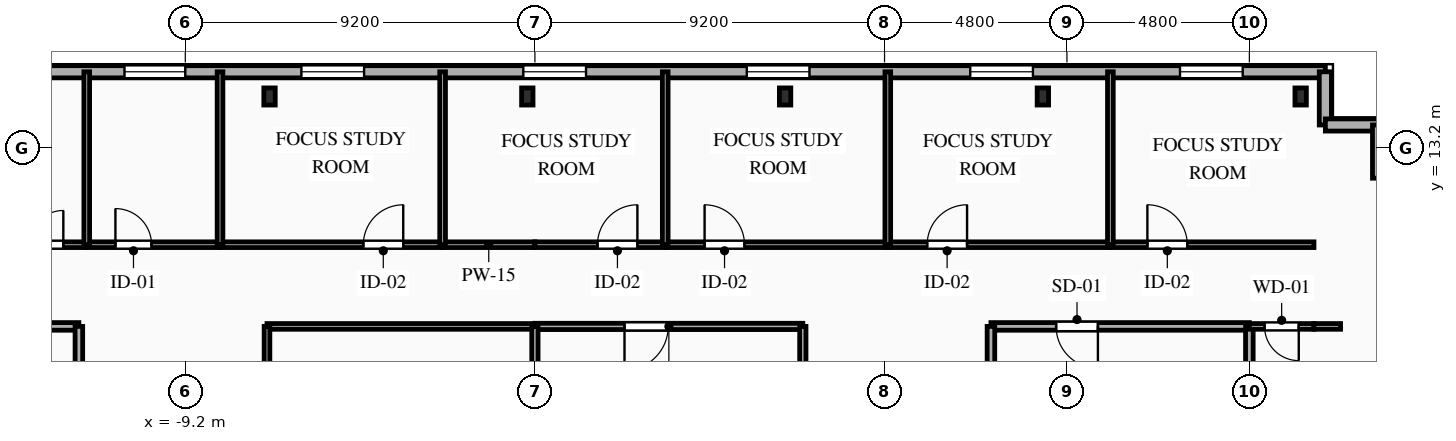
"""IFC4 building model, lengths in metres.
Left out: names, types, materials, properties, quantities, classifications, styles, units other than length and angle.
Written with IfcOpenShell. Run it as: python <this file> out.ifc"""

import sys

from ifc_helpers import new_model, si_unit, direction, frame, frame_2d, origin, origin_2d, place, context, subcontext, project, spatial, rectangle, i_section, extrude, element, fill, save


model = new_model("IFC4")
c1 = context("Model", 3, precision=1e-05, world=origin(), true_north=direction((0.0, 1.0)))
c2 = subcontext(c1, "Body", "Model", "MODEL_VIEW")
j1 = project(units=[si_unit("LENGTHUNIT", "METRE"), si_unit("PLANEANGLEUNIT", "RADIAN")], contexts=[c1])
p1 = place(None, origin())
s1 = spatial("IfcSite", under=j1, at=p1, CompositionType="ELEMENT")
p2 = place(p1, origin())
s2 = spatial("IfcBuilding", under=s1, at=p2, CompositionType="ELEMENT")
p3 = place(p2, frame((0.0, 0.0, 245.05)))
s3 = spatial("IfcBuildingStorey", under=s2, at=p3, CompositionType="ELEMENT", Elevation=245.05)
for number, where, z_axis, x_axis in (
    (1, (20.15, 14.55, 0.0), (0.0, 0.0, 1.0), (1.0, 0.0, 0.0)),
    (2, (13.367, 14.55, 0.0), (0.0, 0.0, 1.0), (1.0, 0.0, 0.0)),
    (3, (6.583, 14.55, 0.0), (0.0, 0.0, 1.0), (1.0, 0.0, 0.0)),
    (4, (-0.2, 14.55, 0.0), (0.0, 0.0, 1.0), (1.0, 0.0, 0.0)),
    (5, (-6.983, 14.55, 0.0), (0.0, 0.0, 1.0), (1.0, 0.0, 0.0)),
):
    element("IfcColumn", number, at=place(p3, frame(where, z_axis=z_axis, x_axis=x_axis)), inside=s3, PredefinedType="COLUMN", context=c2, shape_type="SweptSolid", body=[
        extrude(i_section(OverallWidth=0.3, OverallDepth=0.45, WebThickness=0.014, FlangeThickness=0.026, FilletRadius=0.027, at=origin_2d()), origin(), (0.0, 0.0, 1.0), 3.35),
    ])
p4 = place(p3, frame((-21.2, 15.2, 0.0), z_axis=(0.0, 0.0, 1.0), x_axis=(1.0, 0.0, 0.0)))
e6 = element("IfcWall", 6, at=p4, inside=s3, PredefinedType="SOLIDWALL", context=c2, shape_type="SweptSolid", body=[
    extrude(rectangle(XDim=42.0, YDim=0.32, at=frame_2d((21.0, 0.0))), origin(), (0.0, 0.0, 1.0), 3.04),
])
p5 = place(p4, frame((3.095, 0.0, 0.85)))
e7 = element("IfcOpeningElement", 7, at=p5, cuts=e6, PredefinedType="OPENING", context=c2, shape_type="SweptSolid", body=[
    extrude(rectangle(XDim=1.65, YDim=1.85, at=frame_2d((0.825, 0.925))), frame((0.0, 0.17, 0.0), z_axis=(0.0, -1.0, 0.0), x_axis=(1.0, 0.0, 0.0)), (0.0, 0.0, 1.0), 0.34),
])
p6 = place(p4, frame((10.4, 0.0, 0.85)))
e8 = element("IfcOpeningElement", 8, at=p6, cuts=e6, PredefinedType="OPENING", context=c2, shape_type="SweptSolid", body=[
    extrude(rectangle(XDim=1.6, YDim=1.85, at=frame_2d((0.8, 0.925))), frame((0.0, 0.17, 0.0), z_axis=(0.0, -1.0, 0.0), x_axis=(1.0, 0.0, 0.0)), (0.0, 0.0, 1.0), 0.34),
])
p7 = place(p4, frame((15.055, 0.0, 0.85)))
e9 = element("IfcOpeningElement", 9, at=p7, cuts=e6, PredefinedType="OPENING", context=c2, shape_type="SweptSolid", body=[
    extrude(rectangle(XDim=1.65, YDim=1.85, at=frame_2d((0.825, 0.925))), frame((0.0, 0.17, 0.0), z_axis=(0.0, -1.0, 0.0), x_axis=(1.0, 0.0, 0.0)), (0.0, 0.0, 1.0), 0.34),
])
p8 = place(p4, frame((20.895, 0.0, 0.85)))
e10 = element("IfcOpeningElement", 10, at=p8, cuts=e6, PredefinedType="OPENING", context=c2, shape_type="SweptSolid", body=[
    extrude(rectangle(XDim=1.65, YDim=1.85, at=frame_2d((0.825, 0.925))), frame((0.0, 0.17, 0.0), z_axis=(0.0, -1.0, 0.0), x_axis=(1.0, 0.0, 0.0)), (0.0, 0.0, 1.0), 0.34),
])
p9 = place(p4, frame((26.775, 0.0, 0.85)))
e11 = element("IfcOpeningElement", 11, at=p9, cuts=e6, PredefinedType="OPENING", context=c2, shape_type="SweptSolid", body=[
    extrude(rectangle(XDim=1.65, YDim=1.85, at=frame_2d((0.825, 0.925))), frame((0.0, 0.17, 0.0), z_axis=(0.0, -1.0, 0.0), x_axis=(1.0, 0.0, 0.0)), (0.0, 0.0, 1.0), 0.34),
])
p10 = place(p4, frame((32.655, 0.0, 0.85)))
e12 = element("IfcOpeningElement", 12, at=p10, cuts=e6, PredefinedType="OPENING", context=c2, shape_type="SweptSolid", body=[
    extrude(rectangle(XDim=1.65, YDim=1.85, at=frame_2d((0.825, 0.925))), frame((0.0, 0.17, 0.0), z_axis=(0.0, -1.0, 0.0), x_axis=(1.0, 0.0, 0.0)), (0.0, 0.0, 1.0), 0.34),
])
p11 = place(p4, frame((38.175, 0.0, 0.85)))
e13 = element("IfcOpeningElement", 13, at=p11, cuts=e6, PredefinedType="OPENING", context=c2, shape_type="SweptSolid", body=[
    extrude(rectangle(XDim=1.65, YDim=1.85, at=frame_2d((0.825, 0.925))), frame((0.0, 0.17, 0.0), z_axis=(0.0, -1.0, 0.0), x_axis=(1.0, 0.0, 0.0)), (0.0, 0.0, 1.0), 0.34),
])
for number, where, z_axis, x_axis in (
    (14, (20.8, 15.2, 0.0), (0.0, 0.0, 1.0), (0.0, -1.0, 0.0)),
    (15, (20.8, 13.8, 0.0), (0.0, 0.0, 1.0), (1.0, 0.0, 0.0)),
):
    element("IfcWall", number, at=place(p3, frame(where, z_axis=z_axis, x_axis=x_axis)), inside=s3, PredefinedType="SOLIDWALL", context=c2, shape_type="SweptSolid", body=[
        extrude(rectangle(XDim=1.4, YDim=0.32, at=frame_2d((0.7, 0.0))), origin(), (0.0, 0.0, 1.0), 3.04),
    ])
p12 = place(p3, frame((22.2, 13.8, 0.0), z_axis=(0.0, 0.0, 1.0), x_axis=(0.0, -1.0, 0.0)))
e16 = element("IfcWall", 16, at=p12, inside=s3, PredefinedType="SOLIDWALL", context=c2, shape_type="SweptSolid", body=[
    extrude(rectangle(XDim=1.4, YDim=0.32, at=frame_2d((0.7, 0.0))), origin(), (0.0, 0.0, 1.0), 3.04),
])
p13 = place(p3, frame((-12.0, 8.5, 0.0), z_axis=(0.0, 0.0, 1.0), x_axis=(-1.0, 0.0, 0.0)))
e17 = element("IfcWall", 17, at=p13, inside=s3, PredefinedType="PARTITIONING", context=c2, shape_type="SweptSolid", body=[
    extrude(rectangle(XDim=6.8, YDim=0.2, at=frame_2d((3.4, 0.0))), origin(), (0.0, 0.0, 1.0), 3.04),
])
p14 = place(p13, frame((1.715, 0.0, 0.0)))
e18 = element("IfcOpeningElement", 18, at=p14, cuts=e17, PredefinedType="OPENING", context=c2, shape_type="SweptSolid", body=[
    extrude(rectangle(XDim=1.1, YDim=2.15, at=frame_2d((0.55, 1.075))), frame((0.0, 0.11, 0.0), z_axis=(0.0, -1.0, 0.0), x_axis=(1.0, 0.0, 0.0)), (0.0, 0.0, 1.0), 0.22),
])
p15 = place(p3, frame((-12.0, 5.6, 0.0), z_axis=(0.0, 0.0, 1.0), x_axis=(0.0, 1.0, 0.0)))
e19 = element("IfcWall", 19, at=p15, inside=s3, PredefinedType="PARTITIONING", context=c2, shape_type="SweptSolid", body=[
    extrude(rectangle(XDim=2.9, YDim=0.2, at=frame_2d((1.45, 0.0))), origin(), (0.0, 0.0, 1.0), 3.04),
])
p16 = place(p3, frame((18.8, 8.5, 0.0), z_axis=(0.0, 0.0, 1.0), x_axis=(-1.0, 0.0, 0.0)))
e20 = element("IfcWall", 20, at=p16, inside=s3, PredefinedType="PARTITIONING", context=c2, shape_type="SweptSolid", body=[
    extrude(rectangle(XDim=6.8, YDim=0.2, at=frame_2d((3.4, 0.0))), origin(), (0.0, 0.0, 1.0), 3.04),
])
p17 = place(p16, frame((3.985, 0.0, 0.0)))
e21 = element("IfcOpeningElement", 21, at=p17, cuts=e20, PredefinedType="OPENING", context=c2, shape_type="SweptSolid", body=[
    extrude(rectangle(XDim=1.1, YDim=2.15, at=frame_2d((0.55, 1.075))), frame((0.0, 0.11, 0.0), z_axis=(0.0, -1.0, 0.0), x_axis=(1.0, 0.0, 0.0)), (0.0, 0.0, 1.0), 0.22),
])
p18 = place(p3, frame((12.0, 8.5, 0.0), z_axis=(0.0, 0.0, 1.0), x_axis=(0.0, -1.0, 0.0)))
e22 = element("IfcWall", 22, at=p18, inside=s3, PredefinedType="PARTITIONING", context=c2, shape_type="SweptSolid", body=[
    extrude(rectangle(XDim=2.9, YDim=0.2, at=frame_2d((1.45, 0.0))), origin(), (0.0, 0.0, 1.0), 3.04),
])
p19 = place(p3, frame((18.8, 5.6, 0.0), z_axis=(0.0, 0.0, 1.0), x_axis=(0.0, 1.0, 0.0)))
e23 = element("IfcWall", 23, at=p19, inside=s3, PredefinedType="PARTITIONING", context=c2, shape_type="SweptSolid", body=[
    extrude(rectangle(XDim=2.9, YDim=0.2, at=frame_2d((1.45, 0.0))), origin(), (0.0, 0.0, 1.0), 2.665),
])
p20 = place(p3, frame((-14.143, 10.65, 0.0), z_axis=(0.0, 0.0, 1.0), x_axis=(1.0, 0.0, 0.0)))
e24 = element("IfcWall", 24, at=p20, inside=s3, PredefinedType="PLUMBINGWALL", context=c2, shape_type="SweptSolid", body=[
    extrude(rectangle(XDim=2.35, YDim=0.15, at=frame_2d((1.175, 0.0))), origin(), (0.0, 0.0, 1.0), 3.04),
])
p21 = place(p20, frame((0.834, 0.0, 0.0)))
e25 = element("IfcOpeningElement", 25, at=p21, cuts=e24, PredefinedType="OPENING", context=c2, shape_type="SweptSolid", body=[
    extrude(rectangle(XDim=0.9, YDim=2.1, at=frame_2d((0.45, 1.05))), frame((0.0, 0.085, 0.0), z_axis=(0.0, -1.0, 0.0), x_axis=(1.0, 0.0, 0.0)), (0.0, 0.0, 1.0), 0.17),
])
p22 = place(p3, frame((-11.793, 10.65, 0.0), z_axis=(0.0, 0.0, 1.0), x_axis=(1.0, 0.0, 0.0)))
e26 = element("IfcWall", 26, at=p22, inside=s3, PredefinedType="PARTITIONING", context=c2, shape_type="SweptSolid", body=[
    extrude(rectangle(XDim=3.507, YDim=0.15, at=frame_2d((1.753, 0.0))), origin(), (0.0, 0.0, 1.0), 3.04),
])
p23 = place(p22, frame((0.755, 0.0, 0.0)))
e27 = element("IfcOpeningElement", 27, at=p23, cuts=e26, PredefinedType="OPENING", context=c2, shape_type="SweptSolid", body=[
    extrude(rectangle(XDim=0.95, YDim=2.1, at=frame_2d((0.475, 1.05))), frame((0.0, 0.085, 0.0), z_axis=(0.0, -1.0, 0.0), x_axis=(1.0, 0.0, 0.0)), (0.0, 0.0, 1.0), 0.17),
])
p24 = place(p3, frame((-8.286, 10.65, 0.0), z_axis=(0.0, 0.0, 1.0), x_axis=(1.0, 0.0, 0.0)))
e28 = element("IfcWall", 28, at=p24, inside=s3, PredefinedType="PARTITIONING", context=c2, shape_type="SweptSolid", body=[
    extrude(rectangle(XDim=5.857, YDim=0.15, at=frame_2d((2.928, 0.0))), origin(), (0.0, 0.0, 1.0), 3.04),
])
p25 = place(p24, frame((3.771, 0.0, 0.0)))
e29 = element("IfcOpeningElement", 29, at=p25, cuts=e28, PredefinedType="OPENING", context=c2, shape_type="SweptSolid", body=[
    extrude(rectangle(XDim=1.05, YDim=2.15, at=frame_2d((0.525, 1.075))), frame((0.0, 0.085, 0.0), z_axis=(0.0, -1.0, 0.0), x_axis=(1.0, 0.0, 0.0)), (0.0, 0.0, 1.0), 0.17),
])
p26 = place(p3, frame((-2.429, 10.65, 0.0), z_axis=(0.0, 0.0, 1.0), x_axis=(1.0, 0.0, 0.0)))
e30 = element("IfcWall", 30, at=p26, inside=s3, PredefinedType="PARTITIONING", context=c2, shape_type="SweptSolid", body=[
    extrude(rectangle(XDim=2.429, YDim=0.15, at=frame_2d((1.214, 0.0))), origin(), (0.0, 0.0, 1.0), 3.04),
])
p27 = place(p3, frame((0.0, 8.5, 0.0), z_axis=(0.0, 0.0, 1.0), x_axis=(-1.0, 0.0, 0.0)))
e31 = element("IfcWall", 31, at=p27, inside=s3, PredefinedType="PARTITIONING", context=c2, shape_type="SweptSolid", body=[
    extrude(rectangle(XDim=7.05, YDim=0.15, at=frame_2d((3.525, 0.0))), origin(), (0.0, 0.0, 1.0), 3.04),
])
p28 = place(p3, frame((20.5, 8.5, 0.0), z_axis=(0.0, 0.0, 1.0), x_axis=(-1.0, 0.0, 0.0)))
e32 = element("IfcWall", 32, at=p28, inside=s3, PredefinedType="PARTITIONING", context=c2, shape_type="SweptSolid", body=[
    extrude(rectangle(XDim=1.7, YDim=0.15, at=frame_2d((0.85, 0.0))), origin(), (0.0, 0.0, 1.0), 3.04),
])
p29 = place(p28, frame((0.4, 0.0, 0.0)))
e33 = element("IfcOpeningElement", 33, at=p29, cuts=e32, PredefinedType="OPENING", context=c2, shape_type="SweptSolid", body=[
    extrude(rectangle(XDim=0.9, YDim=2.1, at=frame_2d((0.45, 1.05))), frame((0.0, 0.085, 0.0), z_axis=(0.0, -1.0, 0.0), x_axis=(1.0, 0.0, 0.0)), (0.0, 0.0, 1.0), 0.17),
])
p30 = place(p3, frame((21.2, 8.5, 0.0), z_axis=(0.0, 0.0, 1.0), x_axis=(-1.0, 0.0, 0.0)))
e34 = element("IfcWall", 34, at=p30, inside=s3, PredefinedType="PARTITIONING", context=c2, shape_type="SweptSolid", body=[
    extrude(rectangle(XDim=0.7, YDim=0.15, at=frame_2d((0.35, 0.0))), origin(), (0.0, 0.0, 1.0), 3.04),
])
p31 = place(p3, frame((0.0, 10.65, 0.0), z_axis=(0.0, 0.0, 1.0), x_axis=(1.0, 0.0, 0.0)))
e35 = element("IfcWall", 35, at=p31, inside=s3, PredefinedType="PARTITIONING", context=c2, shape_type="SweptSolid", body=[
    extrude(rectangle(XDim=3.429, YDim=0.15, at=frame_2d((1.714, 0.0))), origin(), (0.0, 0.0, 1.0), 3.04),
])
p32 = place(p31, frame((1.646, 0.0, 0.0)))
e36 = element("IfcOpeningElement", 36, at=p32, cuts=e35, PredefinedType="OPENING", context=c2, shape_type="SweptSolid", body=[
    extrude(rectangle(XDim=1.05, YDim=2.15, at=frame_2d((0.525, 1.075))), frame((0.0, 0.085, 0.0), z_axis=(0.0, -1.0, 0.0), x_axis=(1.0, 0.0, 0.0)), (0.0, 0.0, 1.0), 0.17),
])
p33 = place(p3, frame((3.429, 10.65, 0.0), z_axis=(0.0, 0.0, 1.0), x_axis=(1.0, 0.0, 0.0)))
e37 = element("IfcWall", 37, at=p33, inside=s3, PredefinedType="PARTITIONING", context=c2, shape_type="SweptSolid", body=[
    extrude(rectangle(XDim=5.857, YDim=0.15, at=frame_2d((2.928, 0.0))), origin(), (0.0, 0.0, 1.0), 3.04),
])
p34 = place(p33, frame((1.036, 0.0, 0.0)))
e38 = element("IfcOpeningElement", 38, at=p34, cuts=e37, PredefinedType="OPENING", context=c2, shape_type="SweptSolid", body=[
    extrude(rectangle(XDim=1.05, YDim=2.15, at=frame_2d((0.525, 1.075))), frame((0.0, 0.085, 0.0), z_axis=(0.0, -1.0, 0.0), x_axis=(1.0, 0.0, 0.0)), (0.0, 0.0, 1.0), 0.17),
])
p35 = place(p3, frame((9.286, 10.65, 0.0), z_axis=(0.0, 0.0, 1.0), x_axis=(1.0, 0.0, 0.0)))
e39 = element("IfcWall", 39, at=p35, inside=s3, PredefinedType="PARTITIONING", context=c2, shape_type="SweptSolid", body=[
    extrude(rectangle(XDim=5.857, YDim=0.15, at=frame_2d((2.929, 0.0))), origin(), (0.0, 0.0, 1.0), 3.04),
])
p36 = place(p35, frame((1.036, 0.0, 0.0)))
e40 = element("IfcOpeningElement", 40, at=p36, cuts=e39, PredefinedType="OPENING", context=c2, shape_type="SweptSolid", body=[
    extrude(rectangle(XDim=1.05, YDim=2.15, at=frame_2d((0.525, 1.075))), frame((0.0, 0.085, 0.0), z_axis=(0.0, -1.0, 0.0), x_axis=(1.0, 0.0, 0.0)), (0.0, 0.0, 1.0), 0.17),
])
p37 = place(p3, frame((15.143, 10.65, 0.0), z_axis=(0.0, 0.0, 1.0), x_axis=(1.0, 0.0, 0.0)))
e41 = element("IfcWall", 41, at=p37, inside=s3, PredefinedType="PARTITIONING", context=c2, shape_type="SweptSolid", body=[
    extrude(rectangle(XDim=5.357, YDim=0.15, at=frame_2d((2.678, 0.0))), origin(), (0.0, 0.0, 1.0), 3.04),
])
p38 = place(p37, frame((0.973, 0.0, 0.0)))
e42 = element("IfcOpeningElement", 42, at=p38, cuts=e41, PredefinedType="OPENING", context=c2, shape_type="SweptSolid", body=[
    extrude(rectangle(XDim=1.05, YDim=2.15, at=frame_2d((0.525, 1.075))), frame((0.0, 0.085, 0.0), z_axis=(0.0, -1.0, 0.0), x_axis=(1.0, 0.0, 0.0)), (0.0, 0.0, 1.0), 0.17),
])
p39 = place(p3, frame((7.05, 8.5, 0.0), z_axis=(0.0, 0.0, 1.0), x_axis=(-1.0, 0.0, 0.0)))
e43 = element("IfcWall", 43, at=p39, inside=s3, PredefinedType="PARTITIONING", context=c2, shape_type="SweptSolid", body=[
    extrude(rectangle(XDim=7.05, YDim=0.165, at=frame_2d((3.525, 0.0))), origin(), (0.0, 0.0, 1.0), 3.04),
])
p40 = place(p39, frame((3.542, 0.0, 0.0)))
e44 = element("IfcOpeningElement", 44, at=p40, cuts=e43, PredefinedType="OPENING", context=c2, shape_type="SweptSolid", body=[
    extrude(rectangle(XDim=1.15, YDim=2.15, at=frame_2d((0.575, 1.075))), frame((0.0, 0.093, 0.0), z_axis=(0.0, -1.0, 0.0), x_axis=(1.0, 0.0, 0.0)), (0.0, 0.0, 1.0), 0.185),
])
p41 = place(p3, frame((-7.05, 8.5, 0.0), z_axis=(0.0, 0.0, 1.0), x_axis=(0.0, -1.0, 0.0)))
e45 = element("IfcWall", 45, at=p41, inside=s3, PredefinedType="PARTITIONING", context=c2, shape_type="SweptSolid", body=[
    extrude(rectangle(XDim=14.1, YDim=0.15, at=frame_2d((7.05, 0.0))), origin(), (0.0, 0.0, 1.0), 3.04),
])
p42 = place(p41, frame((8.011, 0.0, 0.0)))
e46 = element("IfcOpeningElement", 46, at=p42, cuts=e45, PredefinedType="OPENING", context=c2, shape_type="SweptSolid", body=[
    extrude(rectangle(XDim=1.05, YDim=2.15, at=frame_2d((0.525, 1.075))), frame((0.0, 0.085, 0.0), z_axis=(0.0, -1.0, 0.0), x_axis=(1.0, 0.0, 0.0)), (0.0, 0.0, 1.0), 0.17),
])
p43 = place(p3, frame((7.05, 1.45, 0.0), z_axis=(0.0, 0.0, 1.0), x_axis=(0.0, 1.0, 0.0)))
e47 = element("IfcWall", 47, at=p43, inside=s3, PredefinedType="PARTITIONING", context=c2, shape_type="SweptSolid", body=[
    extrude(rectangle(XDim=7.05, YDim=0.165, at=frame_2d((3.525, 0.0))), origin(), (0.0, 0.0, 1.0), 3.04),
])
p44 = place(p3, frame((-11.793, 15.2, 0.0), z_axis=(0.0, 0.0, 1.0), x_axis=(0.0, -1.0, 0.0)))
e48 = element("IfcWall", 48, at=p44, inside=s3, PredefinedType="PLUMBINGWALL", context=c2, shape_type="SweptSolid", body=[
    extrude(rectangle(XDim=4.55, YDim=0.15, at=frame_2d((2.275, 0.0))), origin(), (0.0, 0.0, 1.0), 3.04),
])
for number, where, z_axis, x_axis in (
    (49, (-8.286, 15.2, 0.0), (0.0, 0.0, 1.0), (0.0, -1.0, 0.0)),
    (50, (-2.429, 15.2, 0.0), (0.0, 0.0, 1.0), (0.0, -1.0, 0.0)),
    (51, (3.429, 15.2, 0.0), (0.0, 0.0, 1.0), (0.0, -1.0, 0.0)),
    (52, (9.286, 15.2, 0.0), (0.0, 0.0, 1.0), (0.0, -1.0, 0.0)),
    (53, (15.143, 15.2, 0.0), (0.0, 0.0, 1.0), (0.0, -1.0, 0.0)),
):
    element("IfcWall", number, at=place(p3, frame(where, z_axis=z_axis, x_axis=x_axis)), inside=s3, PredefinedType="PARTITIONING", context=c2, shape_type="SweptSolid", body=[
        extrude(rectangle(XDim=4.55, YDim=0.15, at=frame_2d((2.275, 0.0))), origin(), (0.0, 0.0, 1.0), 3.04),
    ])
p45 = place(p3, frame((0.0, 8.5, 0.0), z_axis=(0.0, 0.0, 1.0), x_axis=(0.0, -1.0, 0.0)))
e54 = element("IfcWall", 54, at=p45, inside=s3, PredefinedType="PARTITIONING", context=c2, shape_type="SweptSolid", body=[
    extrude(rectangle(XDim=7.05, YDim=0.165, at=frame_2d((3.525, 0.0))), origin(), (0.0, 0.0, 1.0), 3.04),
])
p46 = place(p6, origin())
e55 = element("IfcWindow", 55, at=p46, inside=s3, PartitioningType="SINGLE_PANEL", PredefinedType="WINDOW", context=c2, shape_type="SweptSolid", body=[
    extrude(rectangle(XDim=1.6, YDim=1.85, at=frame_2d((0.8, 0.925))), frame((0.0, 0.03, 0.0), z_axis=(0.0, -1.0, 0.0), x_axis=(1.0, 0.0, 0.0)), (0.0, 0.0, 1.0), 0.06),
])
fill(e8, e55)
p47 = place(p7, origin())
e56 = element("IfcWindow", 56, at=p47, inside=s3, PartitioningType="SINGLE_PANEL", PredefinedType="WINDOW", context=c2, shape_type="SweptSolid", body=[
    extrude(rectangle(XDim=1.65, YDim=1.85, at=frame_2d((0.825, 0.925))), frame((0.0, 0.03, 0.0), z_axis=(0.0, -1.0, 0.0), x_axis=(1.0, 0.0, 0.0)), (0.0, 0.0, 1.0), 0.06),
])
fill(e9, e56)
p48 = place(p8, origin())
e57 = element("IfcWindow", 57, at=p48, inside=s3, PartitioningType="SINGLE_PANEL", PredefinedType="WINDOW", context=c2, shape_type="SweptSolid", body=[
    extrude(rectangle(XDim=1.65, YDim=1.85, at=frame_2d((0.825, 0.925))), frame((0.0, 0.03, 0.0), z_axis=(0.0, -1.0, 0.0), x_axis=(1.0, 0.0, 0.0)), (0.0, 0.0, 1.0), 0.06),
])
fill(e10, e57)
p49 = place(p9, origin())
e58 = element("IfcWindow", 58, at=p49, inside=s3, PartitioningType="SINGLE_PANEL", PredefinedType="WINDOW", context=c2, shape_type="SweptSolid", body=[
    extrude(rectangle(XDim=1.65, YDim=1.85, at=frame_2d((0.825, 0.925))), frame((0.0, 0.03, 0.0), z_axis=(0.0, -1.0, 0.0), x_axis=(1.0, 0.0, 0.0)), (0.0, 0.0, 1.0), 0.06),
])
fill(e11, e58)
p50 = place(p10, origin())
e59 = element("IfcWindow", 59, at=p50, inside=s3, PartitioningType="SINGLE_PANEL", PredefinedType="WINDOW", context=c2, shape_type="SweptSolid", body=[
    extrude(rectangle(XDim=1.65, YDim=1.85, at=frame_2d((0.825, 0.925))), frame((0.0, 0.03, 0.0), z_axis=(0.0, -1.0, 0.0), x_axis=(1.0, 0.0, 0.0)), (0.0, 0.0, 1.0), 0.06),
])
fill(e12, e59)
p51 = place(p11, origin())
e60 = element("IfcWindow", 60, at=p51, inside=s3, PartitioningType="SINGLE_PANEL", PredefinedType="WINDOW", context=c2, shape_type="SweptSolid", body=[
    extrude(rectangle(XDim=1.65, YDim=1.85, at=frame_2d((0.825, 0.925))), frame((0.0, 0.03, 0.0), z_axis=(0.0, -1.0, 0.0), x_axis=(1.0, 0.0, 0.0)), (0.0, 0.0, 1.0), 0.06),
])
fill(e13, e60)
p52 = place(p17, origin())
e61 = element("IfcDoor", 61, at=p52, inside=s3, OperationType="SINGLE_SWING_LEFT", PredefinedType="DOOR", context=c2, shape_type="SweptSolid", body=[
    extrude(rectangle(XDim=1.1, YDim=2.15, at=frame_2d((0.55, 1.075))), frame((0.0, 0.025, 0.0), z_axis=(0.0, -1.0, 0.0), x_axis=(1.0, 0.0, 0.0)), (0.0, 0.0, 1.0), 0.05),
])
fill(e21, e61)
p53 = place(p21, origin())
e62 = element("IfcDoor", 62, at=p53, inside=s3, OperationType="SINGLE_SWING_RIGHT", PredefinedType="DOOR", context=c2, shape_type="SweptSolid", body=[
    extrude(rectangle(XDim=0.9, YDim=2.1, at=frame_2d((0.45, 1.05))), frame((0.0, 0.025, 0.0), z_axis=(0.0, -1.0, 0.0), x_axis=(1.0, 0.0, 0.0)), (0.0, 0.0, 1.0), 0.05),
])
fill(e25, e62)
p54 = place(p23, origin())
e63 = element("IfcDoor", 63, at=p54, inside=s3, OperationType="SINGLE_SWING_LEFT", PredefinedType="DOOR", context=c2, shape_type="SweptSolid", body=[
    extrude(rectangle(XDim=0.95, YDim=2.1, at=frame_2d((0.475, 1.05))), frame((0.0, 0.025, 0.0), z_axis=(0.0, -1.0, 0.0), x_axis=(1.0, 0.0, 0.0)), (0.0, 0.0, 1.0), 0.05),
])
fill(e27, e63)
p55 = place(p25, origin())
e64 = element("IfcDoor", 64, at=p55, inside=s3, OperationType="SINGLE_SWING_RIGHT", PredefinedType="DOOR", context=c2, shape_type="SweptSolid", body=[
    extrude(rectangle(XDim=1.05, YDim=2.15, at=frame_2d((0.525, 1.075))), frame((0.0, 0.025, 0.0), z_axis=(0.0, -1.0, 0.0), x_axis=(1.0, 0.0, 0.0)), (0.0, 0.0, 1.0), 0.05),
])
fill(e29, e64)
p56 = place(p29, origin())
e65 = element("IfcDoor", 65, at=p56, inside=s3, OperationType="SINGLE_SWING_LEFT", PredefinedType="DOOR", context=c2, shape_type="SweptSolid", body=[
    extrude(rectangle(XDim=0.9, YDim=2.1, at=frame_2d((0.45, 1.05))), frame((0.0, 0.025, 0.0), z_axis=(0.0, -1.0, 0.0), x_axis=(1.0, 0.0, 0.0)), (0.0, 0.0, 1.0), 0.05),
])
fill(e33, e65)
p57 = place(p32, origin())
e66 = element("IfcDoor", 66, at=p57, inside=s3, OperationType="SINGLE_SWING_RIGHT", PredefinedType="DOOR", context=c2, shape_type="SweptSolid", body=[
    extrude(rectangle(XDim=1.05, YDim=2.15, at=frame_2d((0.525, 1.075))), frame((0.0, 0.025, 0.0), z_axis=(0.0, -1.0, 0.0), x_axis=(1.0, 0.0, 0.0)), (0.0, 0.0, 1.0), 0.05),
])
fill(e36, e66)
p58 = place(p34, origin())
e67 = element("IfcDoor", 67, at=p58, inside=s3, OperationType="SINGLE_SWING_LEFT", PredefinedType="DOOR", context=c2, shape_type="SweptSolid", body=[
    extrude(rectangle(XDim=1.05, YDim=2.15, at=frame_2d((0.525, 1.075))), frame((0.0, 0.025, 0.0), z_axis=(0.0, -1.0, 0.0), x_axis=(1.0, 0.0, 0.0)), (0.0, 0.0, 1.0), 0.05),
])
fill(e38, e67)
p59 = place(p36, origin())
e68 = element("IfcDoor", 68, at=p59, inside=s3, OperationType="SINGLE_SWING_RIGHT", PredefinedType="DOOR", context=c2, shape_type="SweptSolid", body=[
    extrude(rectangle(XDim=1.05, YDim=2.15, at=frame_2d((0.525, 1.075))), frame((0.0, 0.025, 0.0), z_axis=(0.0, -1.0, 0.0), x_axis=(1.0, 0.0, 0.0)), (0.0, 0.0, 1.0), 0.05),
])
fill(e40, e68)
p60 = place(p38, origin())
e69 = element("IfcDoor", 69, at=p60, inside=s3, OperationType="SINGLE_SWING_LEFT", PredefinedType="DOOR", context=c2, shape_type="SweptSolid", body=[
    extrude(rectangle(XDim=1.05, YDim=2.15, at=frame_2d((0.525, 1.075))), frame((0.0, 0.025, 0.0), z_axis=(0.0, -1.0, 0.0), x_axis=(1.0, 0.0, 0.0)), (0.0, 0.0, 1.0), 0.05),
])
fill(e42, e69)
p61 = place(p40, origin())
e70 = element("IfcDoor", 70, at=p61, inside=s3, OperationType="SINGLE_SWING_RIGHT", PredefinedType="DOOR", context=c2, shape_type="SweptSolid", body=[
    extrude(rectangle(XDim=1.15, YDim=2.15, at=frame_2d((0.575, 1.075))), frame((0.0, 0.025, 0.0), z_axis=(0.0, -1.0, 0.0), x_axis=(1.0, 0.0, 0.0)), (0.0, 0.0, 1.0), 0.05),
])
fill(e44, e70)
save(model, sys.argv[1])
